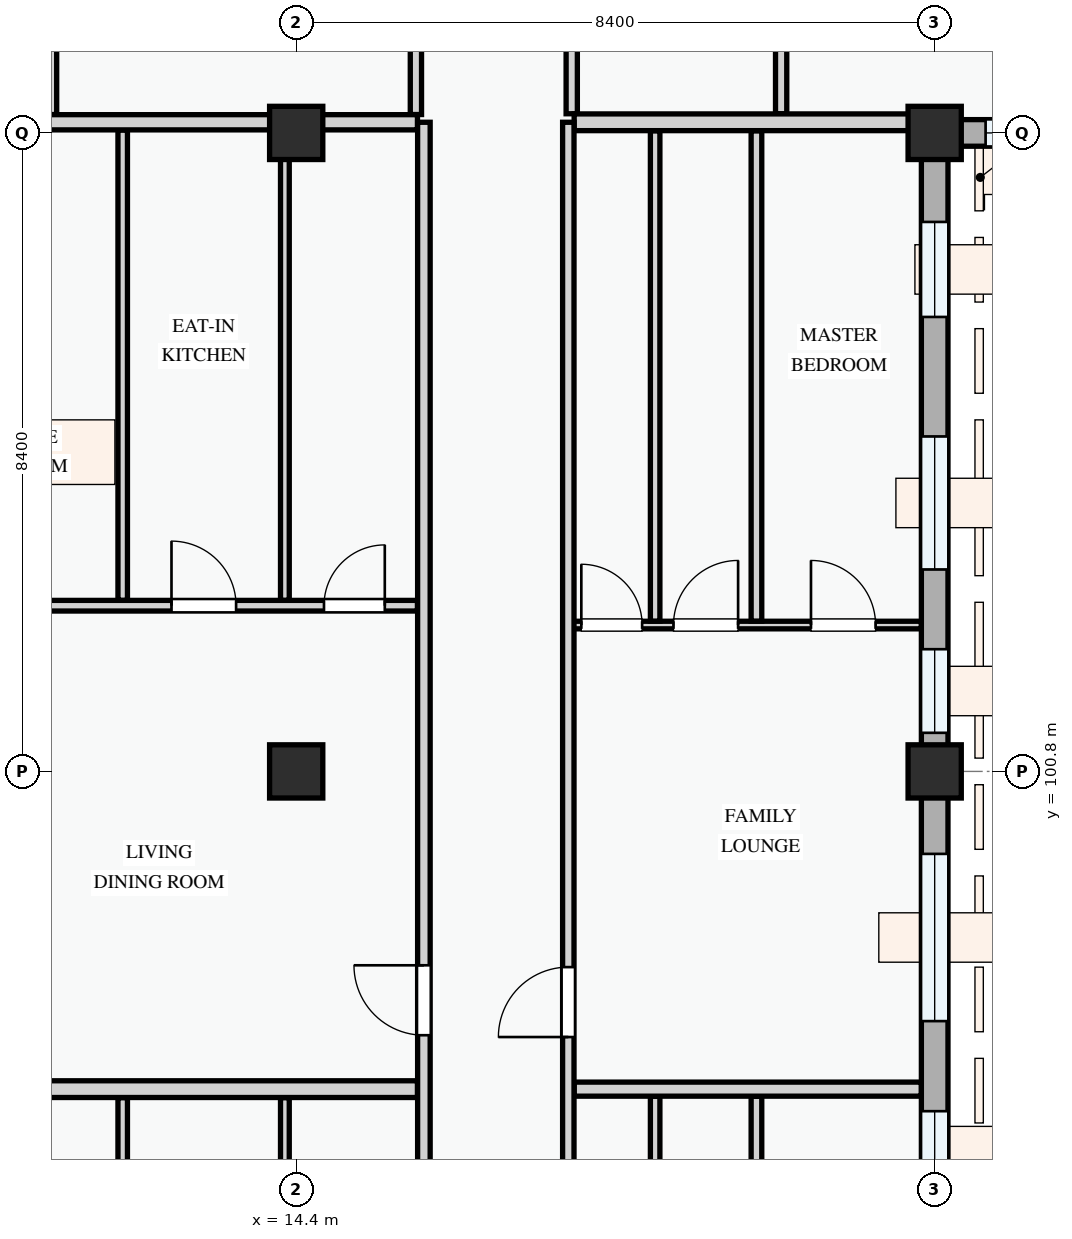
"""IFC4 building model, lengths in metres.
Left out: names, types, materials, properties, quantities, classifications, styles, units other than length and angle.
Written with IfcOpenShell. Run it as: python <this file> out.ifc"""

import sys

from ifc_helpers import new_model, si_unit, direction, frame, frame_2d, origin, origin_2d, place, context, subcontext, project, spatial, rectangle, extrude, element, fill, save


model = new_model("IFC4")
c1 = context("Model", 3, precision=1e-05, world=origin(), true_north=direction((0.0, 1.0)))
c2 = subcontext(c1, "Body", "Model", "MODEL_VIEW")
j1 = project(units=[si_unit("LENGTHUNIT", "METRE"), si_unit("PLANEANGLEUNIT", "RADIAN")], contexts=[c1])
p1 = place(None, origin())
s1 = spatial("IfcSite", under=j1, at=p1, CompositionType="ELEMENT")
p2 = place(p1, origin())
s2 = spatial("IfcBuilding", under=s1, at=p2, CompositionType="ELEMENT")
p3 = place(p2, frame((0.0, 0.0, 14.7)))
s3 = spatial("IfcBuildingStorey", under=s2, at=p3, CompositionType="ELEMENT", Elevation=14.7)
for number, where, z_axis, x_axis in (
    (1, (14.4, 100.8, 0.0), (0.0, 0.0, 1.0), (1.0, 0.0, 0.0)),
    (2, (14.4, 109.2, 0.0), (0.0, 0.0, 1.0), (1.0, 0.0, 0.0)),
    (3, (22.8, 100.8, 0.0), (0.0, 0.0, 1.0), (1.0, 0.0, 0.0)),
    (4, (22.8, 109.2, 0.0), (0.0, 0.0, 1.0), (1.0, 0.0, 0.0)),
):
    element("IfcColumn", number, at=place(p3, frame(where, z_axis=z_axis, x_axis=x_axis)), inside=s3, PredefinedType="COLUMN", context=c2, shape_type="SweptSolid", body=[
        extrude(rectangle(XDim=0.7, YDim=0.7, at=origin_2d()), origin(), (0.0, 0.0, 1.0), 3.3),
    ])
p4 = place(p3, frame((22.8, 109.2, 0.0), z_axis=(0.0, 0.0, 1.0), x_axis=(1.0, 0.0, 0.0)))
e5 = element("IfcWall", 5, at=p4, inside=s3, PredefinedType="STANDARD", context=c2, shape_type="SweptSolid", body=[
    extrude(rectangle(XDim=6.0, YDim=0.35, at=frame_2d((3.0, 0.0))), origin(), (0.0, 0.0, 1.0), 2.475),
])
p5 = place(p4, frame((0.67, 0.0, 0.78)))
e6 = element("IfcOpeningElement", 6, at=p5, cuts=e5, PredefinedType="OPENING", context=c2, shape_type="SweptSolid", body=[
    extrude(rectangle(XDim=1.2, YDim=1.35, at=frame_2d((0.6, 0.675))), frame((0.0, 0.185, 0.0), z_axis=(0.0, -1.0, 0.0), x_axis=(1.0, 0.0, 0.0)), (0.0, 0.0, 1.0), 0.37),
])
p6 = place(p4, frame((2.905, 0.0, 0.78)))
e7 = element("IfcOpeningElement", 7, at=p6, cuts=e5, PredefinedType="OPENING", context=c2, shape_type="SweptSolid", body=[
    extrude(rectangle(XDim=2.35, YDim=1.55, at=frame_2d((1.175, 0.775))), frame((0.0, 0.185, 0.0), z_axis=(0.0, -1.0, 0.0), x_axis=(1.0, 0.0, 0.0)), (0.0, 0.0, 1.0), 0.37),
])
p7 = place(p3, frame((22.8, 94.8, 0.0), z_axis=(0.0, 0.0, 1.0), x_axis=(0.0, 1.0, 0.0)))
e8 = element("IfcWall", 8, at=p7, inside=s3, PredefinedType="STANDARD", context=c2, shape_type="SweptSolid", body=[
    extrude(rectangle(XDim=6.0, YDim=0.35, at=frame_2d((3.0, 0.0))), origin(), (0.0, 0.0, 1.0), 2.575),
])
p8 = place(p7, frame((0.48, 0.0, 0.78)))
e9 = element("IfcOpeningElement", 9, at=p8, cuts=e8, PredefinedType="OPENING", context=c2, shape_type="SweptSolid", body=[
    extrude(rectangle(XDim=1.05, YDim=1.2, at=frame_2d((0.525, 0.6))), frame((0.0, 0.185, 0.0), z_axis=(0.0, -1.0, 0.0), x_axis=(1.0, 0.0, 0.0)), (0.0, 0.0, 1.0), 0.37),
])
p9 = place(p7, frame((2.715, 0.0, 0.78)))
e10 = element("IfcOpeningElement", 10, at=p9, cuts=e8, PredefinedType="OPENING", context=c2, shape_type="SweptSolid", body=[
    extrude(rectangle(XDim=2.2, YDim=1.5, at=frame_2d((1.1, 0.75))), frame((0.0, 0.185, 0.0), z_axis=(0.0, -1.0, 0.0), x_axis=(1.0, 0.0, 0.0)), (0.0, 0.0, 1.0), 0.37),
])
p10 = place(p3, frame((22.8, 100.8, 0.0), z_axis=(0.0, 0.0, 1.0), x_axis=(0.0, 1.0, 0.0)))
e11 = element("IfcWall", 11, at=p10, inside=s3, PredefinedType="STANDARD", context=c2, shape_type="SweptSolid", body=[
    extrude(rectangle(XDim=8.4, YDim=0.35, at=frame_2d((4.2, 0.0))), origin(), (0.0, 0.0, 1.0), 2.425),
])
p11 = place(p10, frame((0.508, 0.0, 0.78)))
e12 = element("IfcOpeningElement", 12, at=p11, cuts=e11, PredefinedType="OPENING", context=c2, shape_type="SweptSolid", body=[
    extrude(rectangle(XDim=1.1, YDim=1.3, at=frame_2d((0.55, 0.65))), frame((0.0, 0.185, 0.0), z_axis=(0.0, -1.0, 0.0), x_axis=(1.0, 0.0, 0.0)), (0.0, 0.0, 1.0), 0.37),
])
p12 = place(p10, frame((2.657, 0.0, 0.78)))
e13 = element("IfcOpeningElement", 13, at=p12, cuts=e11, PredefinedType="OPENING", context=c2, shape_type="SweptSolid", body=[
    extrude(rectangle(XDim=1.75, YDim=1.45, at=frame_2d((0.875, 0.725))), frame((0.0, 0.185, 0.0), z_axis=(0.0, -1.0, 0.0), x_axis=(1.0, 0.0, 0.0)), (0.0, 0.0, 1.0), 0.37),
])
p13 = place(p10, frame((5.979, 0.0, 0.78)))
e14 = element("IfcOpeningElement", 14, at=p13, cuts=e11, PredefinedType="OPENING", context=c2, shape_type="SweptSolid", body=[
    extrude(rectangle(XDim=1.25, YDim=1.3, at=frame_2d((0.625, 0.65))), frame((0.0, 0.185, 0.0), z_axis=(0.0, -1.0, 0.0), x_axis=(1.0, 0.0, 0.0)), (0.0, 0.0, 1.0), 0.37),
])
for number, where, z_axis, x_axis in (
    (15, (11.175, 113.324, 0.0), (0.0, 0.0, 1.0), (0.0, -1.0, 0.0)),
    (16, (15.975, 113.324, 0.0), (0.0, 0.0, 1.0), (0.0, -1.0, 0.0)),
):
    element("IfcWall", number, at=place(p3, frame(where, z_axis=z_axis, x_axis=x_axis)), inside=s3, PredefinedType="PARTITIONING", context=c2, shape_type="SweptSolid", body=[
        extrude(rectangle(XDim=3.882, YDim=0.148, at=frame_2d((1.941, 0.0))), origin(), (0.0, 0.0, 1.0), 3.0),
    ])
for number, where, z_axis, x_axis in (
    (17, (18.025, 113.324, 0.0), (0.0, 0.0, 1.0), (0.0, -1.0, 0.0)),
    (18, (20.78, 113.324, 0.0), (0.0, 0.0, 1.0), (0.0, -1.0, 0.0)),
):
    element("IfcWall", number, at=place(p3, frame(where, z_axis=z_axis, x_axis=x_axis)), inside=s3, PredefinedType="PARTITIONING", context=c2, shape_type="SweptSolid", body=[
        extrude(rectangle(XDim=3.872, YDim=0.148, at=frame_2d((1.936, 0.0))), origin(), (0.0, 0.0, 1.0), 3.0),
    ])
p14 = place(p3, frame((12.118, 90.002, 0.0), z_axis=(0.0, 0.0, 1.0), x_axis=(0.0, 1.0, 0.0)))
e19 = element("IfcWall", 19, at=p14, inside=s3, PredefinedType="PARTITIONING", context=c2, shape_type="SweptSolid", body=[
    extrude(rectangle(XDim=6.506, YDim=0.125, at=frame_2d((3.253, 0.0))), origin(), (0.0, 0.0, 1.0), 3.0),
])
p15 = place(p3, frame((14.251, 90.002, 0.0), z_axis=(0.0, 0.0, 1.0), x_axis=(0.0, 1.0, 0.0)))
e20 = element("IfcWall", 20, at=p15, inside=s3, PredefinedType="PARTITIONING", context=c2, shape_type="SweptSolid", body=[
    extrude(rectangle(XDim=6.506, YDim=0.115, at=frame_2d((3.253, 0.0))), origin(), (0.0, 0.0, 1.0), 2.425),
])
p16 = place(p3, frame((20.455, 89.714, 0.0), z_axis=(0.0, 0.0, 1.0), x_axis=(0.0, 1.0, 0.0)))
e21 = element("IfcWall", 21, at=p16, inside=s3, PredefinedType="PARTITIONING", context=c2, shape_type="SweptSolid", body=[
    extrude(rectangle(XDim=6.811, YDim=0.14, at=frame_2d((3.406, 0.0))), origin(), (0.0, 0.0, 1.0), 3.0),
])
p17 = place(p3, frame((19.122, 89.714, 0.0), z_axis=(0.0, 0.0, 1.0), x_axis=(0.0, 1.0, 0.0)))
e22 = element("IfcWall", 22, at=p17, inside=s3, PredefinedType="PARTITIONING", context=c2, shape_type="SweptSolid", body=[
    extrude(rectangle(XDim=6.811, YDim=0.125, at=frame_2d((3.406, 0.0))), origin(), (0.0, 0.0, 1.0), 3.0),
])
p18 = place(p3, frame((8.577, 102.98, 0.0), z_axis=(0.0, 0.0, 1.0), x_axis=(1.0, 0.0, 0.0)))
e23 = element("IfcWall", 23, at=p18, inside=s3, PredefinedType="PARTITIONING", context=c2, shape_type="SweptSolid", body=[
    extrude(rectangle(XDim=7.419, YDim=0.14, at=frame_2d((3.709, 0.0))), origin(), (0.0, 0.0, 1.0), 3.0),
])
p19 = place(p18, frame((1.287, 0.0, 0.0)))
e24 = element("IfcOpeningElement", 24, at=p19, cuts=e23, PredefinedType="OPENING", context=c2, shape_type="SweptSolid", body=[
    extrude(rectangle(XDim=0.85, YDim=2.1, at=frame_2d((0.425, 1.05))), frame((0.0, 0.08, 0.0), z_axis=(0.0, -1.0, 0.0), x_axis=(1.0, 0.0, 0.0)), (0.0, 0.0, 1.0), 0.16),
])
p20 = place(p18, frame((4.182, 0.0, 0.0)))
e25 = element("IfcOpeningElement", 25, at=p20, cuts=e23, PredefinedType="OPENING", context=c2, shape_type="SweptSolid", body=[
    extrude(rectangle(XDim=0.85, YDim=2.1, at=frame_2d((0.425, 1.05))), frame((0.0, 0.08, 0.0), z_axis=(0.0, -1.0, 0.0), x_axis=(1.0, 0.0, 0.0)), (0.0, 0.0, 1.0), 0.16),
])
p21 = place(p18, frame((6.189, 0.0, 0.0)))
e26 = element("IfcOpeningElement", 26, at=p21, cuts=e23, PredefinedType="OPENING", context=c2, shape_type="SweptSolid", body=[
    extrude(rectangle(XDim=0.8, YDim=2.1, at=frame_2d((0.4, 1.05))), frame((0.0, 0.08, 0.0), z_axis=(0.0, -1.0, 0.0), x_axis=(1.0, 0.0, 0.0)), (0.0, 0.0, 1.0), 0.16),
])
p22 = place(p3, frame((12.118, 103.052, 0.0), z_axis=(0.0, 0.0, 1.0), x_axis=(0.0, 1.0, 0.0)))
e27 = element("IfcWall", 27, at=p22, inside=s3, PredefinedType="PARTITIONING", context=c2, shape_type="SweptSolid", body=[
    extrude(rectangle(XDim=6.186, YDim=0.125, at=frame_2d((3.093, 0.0))), origin(), (0.0, 0.0, 1.0), 3.0),
])
p23 = place(p3, frame((14.251, 103.052, 0.0), z_axis=(0.0, 0.0, 1.0), x_axis=(0.0, 1.0, 0.0)))
e28 = element("IfcWall", 28, at=p23, inside=s3, PredefinedType="PARTITIONING", context=c2, shape_type="SweptSolid", body=[
    extrude(rectangle(XDim=6.186, YDim=0.115, at=frame_2d((3.093, 0.0))), origin(), (0.0, 0.0, 1.0), 2.425),
])
p24 = place(p3, frame((17.98, 102.726, 0.0), z_axis=(0.0, 0.0, 1.0), x_axis=(1.0, 0.0, 0.0)))
e29 = element("IfcWall", 29, at=p24, inside=s3, PredefinedType="PARTITIONING", context=c2, shape_type="SweptSolid", body=[
    extrude(rectangle(XDim=4.643, YDim=0.1, at=frame_2d((2.322, 0.0))), origin(), (0.0, 0.0, 1.0), 3.0),
])
p25 = place(p24, frame((0.171, 0.0, 0.0)))
e30 = element("IfcOpeningElement", 30, at=p25, cuts=e29, PredefinedType="OPENING", context=c2, shape_type="SweptSolid", body=[
    extrude(rectangle(XDim=0.8, YDim=2.1, at=frame_2d((0.4, 1.05))), frame((0.0, 0.06, 0.0), z_axis=(0.0, -1.0, 0.0), x_axis=(1.0, 0.0, 0.0)), (0.0, 0.0, 1.0), 0.12),
])
p26 = place(p24, frame((1.384, 0.0, 0.0)))
e31 = element("IfcOpeningElement", 31, at=p26, cuts=e29, PredefinedType="OPENING", context=c2, shape_type="SweptSolid", body=[
    extrude(rectangle(XDim=0.85, YDim=2.1, at=frame_2d((0.425, 1.05))), frame((0.0, 0.06, 0.0), z_axis=(0.0, -1.0, 0.0), x_axis=(1.0, 0.0, 0.0)), (0.0, 0.0, 1.0), 0.12),
])
p27 = place(p24, frame((3.193, 0.0, 0.0)))
e32 = element("IfcOpeningElement", 32, at=p27, cuts=e29, PredefinedType="OPENING", context=c2, shape_type="SweptSolid", body=[
    extrude(rectangle(XDim=0.85, YDim=2.1, at=frame_2d((0.425, 1.05))), frame((0.0, 0.06, 0.0), z_axis=(0.0, -1.0, 0.0), x_axis=(1.0, 0.0, 0.0)), (0.0, 0.0, 1.0), 0.12),
])
p28 = place(p3, frame((20.455, 102.778, 0.0), z_axis=(0.0, 0.0, 1.0), x_axis=(0.0, 1.0, 0.0)))
e33 = element("IfcWall", 33, at=p28, inside=s3, PredefinedType="PARTITIONING", context=c2, shape_type="SweptSolid", body=[
    extrude(rectangle(XDim=6.45, YDim=0.14, at=frame_2d((3.225, 0.0))), origin(), (0.0, 0.0, 1.0), 3.0),
])
p29 = place(p3, frame((19.122, 102.778, 0.0), z_axis=(0.0, 0.0, 1.0), x_axis=(0.0, 1.0, 0.0)))
e34 = element("IfcWall", 34, at=p29, inside=s3, PredefinedType="PARTITIONING", context=c2, shape_type="SweptSolid", body=[
    extrude(rectangle(XDim=6.45, YDim=0.125, at=frame_2d((3.225, 0.0))), origin(), (0.0, 0.0, 1.0), 3.0),
])
p30 = place(p3, frame((8.577, 96.62, 0.0), z_axis=(0.0, 0.0, 1.0), x_axis=(1.0, 0.0, 0.0)))
e35 = element("IfcWall", 35, at=p30, inside=s3, PredefinedType="PARTITIONING", context=c2, shape_type="SweptSolid", body=[
    extrude(rectangle(XDim=7.419, YDim=0.22, at=frame_2d((3.709, 0.0))), origin(), (0.0, 0.0, 1.0), 3.0),
])
p31 = place(p3, frame((18.057, 96.62, 0.0), z_axis=(0.0, 0.0, 1.0), x_axis=(1.0, 0.0, 0.0)))
e36 = element("IfcWall", 36, at=p31, inside=s3, PredefinedType="PARTITIONING", context=c2, shape_type="SweptSolid", body=[
    extrude(rectangle(XDim=4.566, YDim=0.185, at=frame_2d((2.283, 0.0))), origin(), (0.0, 0.0, 1.0), 3.0),
])
p32 = place(p3, frame((8.577, 109.34, 0.0), z_axis=(0.0, 0.0, 1.0), x_axis=(1.0, 0.0, 0.0)))
e37 = element("IfcWall", 37, at=p32, inside=s3, PredefinedType="PARTITIONING", context=c2, shape_type="SweptSolid", body=[
    extrude(rectangle(XDim=7.419, YDim=0.2, at=frame_2d((3.709, 0.0))), origin(), (0.0, 0.0, 1.0), 2.375),
])
p33 = place(p3, frame((18.057, 109.34, 0.0), z_axis=(0.0, 0.0, 1.0), x_axis=(1.0, 0.0, 0.0)))
e38 = element("IfcWall", 38, at=p33, inside=s3, PredefinedType="PARTITIONING", context=c2, shape_type="SweptSolid", body=[
    extrude(rectangle(XDim=4.683, YDim=0.22, at=frame_2d((2.342, 0.0))), origin(), (0.0, 0.0, 1.0), 2.375),
])
p34 = place(p3, frame((16.08, 72.177, 0.0), z_axis=(0.0, 0.0, 1.0), x_axis=(0.0, 1.0, 0.0)))
e39 = element("IfcWall", 39, at=p34, inside=s3, PredefinedType="PARTITIONING", context=c2, shape_type="SweptSolid", body=[
    extrude(rectangle(XDim=37.163, YDim=0.165, at=frame_2d((18.582, 0.0))), origin(), (0.0, 0.0, 1.0), 3.0),
])
p35 = place(p34, frame((3.489, 0.0, 0.0)))
e40 = element("IfcOpeningElement", 40, at=p35, cuts=e39, PredefinedType="OPENING", context=c2, shape_type="SweptSolid", body=[
    extrude(rectangle(XDim=0.92, YDim=2.1, at=frame_2d((0.46, 1.05))), frame((0.0, 0.093, 0.0), z_axis=(0.0, -1.0, 0.0), x_axis=(1.0, 0.0, 0.0)), (0.0, 0.0, 1.0), 0.185),
])
p36 = place(p34, frame((16.543, 0.0, 0.0)))
e41 = element("IfcOpeningElement", 41, at=p36, cuts=e39, PredefinedType="OPENING", context=c2, shape_type="SweptSolid", body=[
    extrude(rectangle(XDim=0.92, YDim=2.1, at=frame_2d((0.46, 1.05))), frame((0.0, 0.093, 0.0), z_axis=(0.0, -1.0, 0.0), x_axis=(1.0, 0.0, 0.0)), (0.0, 0.0, 1.0), 0.185),
])
p37 = place(p34, frame((25.152, 0.0, 0.0)))
e42 = element("IfcOpeningElement", 42, at=p37, cuts=e39, PredefinedType="OPENING", context=c2, shape_type="SweptSolid", body=[
    extrude(rectangle(XDim=0.92, YDim=2.1, at=frame_2d((0.46, 1.05))), frame((0.0, 0.093, 0.0), z_axis=(0.0, -1.0, 0.0), x_axis=(1.0, 0.0, 0.0)), (0.0, 0.0, 1.0), 0.185),
])
p38 = place(p3, frame((17.98, 72.177, 0.0), z_axis=(0.0, 0.0, 1.0), x_axis=(0.0, 1.0, 0.0)))
e43 = element("IfcWall", 43, at=p38, inside=s3, PredefinedType="PARTITIONING", context=c2, shape_type="SweptSolid", body=[
    extrude(rectangle(XDim=37.163, YDim=0.15, at=frame_2d((18.582, 0.0))), origin(), (0.0, 0.0, 1.0), 3.0),
])
p39 = place(p38, frame((3.551, 0.0, 0.0)))
e44 = element("IfcOpeningElement", 44, at=p39, cuts=e43, PredefinedType="OPENING", context=c2, shape_type="SweptSolid", body=[
    extrude(rectangle(XDim=0.92, YDim=2.1, at=frame_2d((0.46, 1.05))), frame((0.0, 0.085, 0.0), z_axis=(0.0, -1.0, 0.0), x_axis=(1.0, 0.0, 0.0)), (0.0, 0.0, 1.0), 0.17),
])
p40 = place(p38, frame((16.275, 0.0, 0.0)))
e45 = element("IfcOpeningElement", 45, at=p40, cuts=e43, PredefinedType="OPENING", context=c2, shape_type="SweptSolid", body=[
    extrude(rectangle(XDim=0.96, YDim=2.12, at=frame_2d((0.48, 1.06))), frame((0.0, 0.085, 0.0), z_axis=(0.0, -1.0, 0.0), x_axis=(1.0, 0.0, 0.0)), (0.0, 0.0, 1.0), 0.17),
])
p41 = place(p38, frame((25.128, 0.0, 0.0)))
e46 = element("IfcOpeningElement", 46, at=p41, cuts=e43, PredefinedType="OPENING", context=c2, shape_type="SweptSolid", body=[
    extrude(rectangle(XDim=0.92, YDim=2.1, at=frame_2d((0.46, 1.05))), frame((0.0, 0.085, 0.0), z_axis=(0.0, -1.0, 0.0), x_axis=(1.0, 0.0, 0.0)), (0.0, 0.0, 1.0), 0.17),
])
p42 = place(p5, origin())
e47 = element("IfcWindow", 47, at=p42, inside=s3, PartitioningType="SINGLE_PANEL", PredefinedType="WINDOW", context=c2, shape_type="SweptSolid", body=[
    extrude(rectangle(XDim=1.2, YDim=1.35, at=frame_2d((0.6, 0.675))), frame((0.0, 0.03, 0.0), z_axis=(0.0, -1.0, 0.0), x_axis=(1.0, 0.0, 0.0)), (0.0, 0.0, 1.0), 0.06),
])
fill(e6, e47)
p43 = place(p8, origin())
e48 = element("IfcWindow", 48, at=p43, inside=s3, PartitioningType="SINGLE_PANEL", PredefinedType="WINDOW", context=c2, shape_type="SweptSolid", body=[
    extrude(rectangle(XDim=1.05, YDim=1.2, at=frame_2d((0.525, 0.6))), frame((0.0, 0.03, 0.0), z_axis=(0.0, -1.0, 0.0), x_axis=(1.0, 0.0, 0.0)), (0.0, 0.0, 1.0), 0.06),
])
fill(e9, e48)
p44 = place(p9, origin())
e49 = element("IfcWindow", 49, at=p44, inside=s3, PartitioningType="DOUBLE_PANEL_VERTICAL", PredefinedType="WINDOW", context=c2, shape_type="SweptSolid", body=[
    extrude(rectangle(XDim=2.2, YDim=1.5, at=frame_2d((1.1, 0.75))), frame((0.0, 0.03, 0.0), z_axis=(0.0, -1.0, 0.0), x_axis=(1.0, 0.0, 0.0)), (0.0, 0.0, 1.0), 0.06),
])
fill(e10, e49)
p45 = place(p11, origin())
e50 = element("IfcWindow", 50, at=p45, inside=s3, PartitioningType="SINGLE_PANEL", PredefinedType="WINDOW", context=c2, shape_type="SweptSolid", body=[
    extrude(rectangle(XDim=1.1, YDim=1.3, at=frame_2d((0.55, 0.65))), frame((0.0, 0.03, 0.0), z_axis=(0.0, -1.0, 0.0), x_axis=(1.0, 0.0, 0.0)), (0.0, 0.0, 1.0), 0.06),
])
fill(e12, e50)
p46 = place(p12, origin())
e51 = element("IfcWindow", 51, at=p46, inside=s3, PartitioningType="DOUBLE_PANEL_VERTICAL", PredefinedType="WINDOW", context=c2, shape_type="SweptSolid", body=[
    extrude(rectangle(XDim=1.75, YDim=1.45, at=frame_2d((0.875, 0.725))), frame((0.0, 0.03, 0.0), z_axis=(0.0, -1.0, 0.0), x_axis=(1.0, 0.0, 0.0)), (0.0, 0.0, 1.0), 0.06),
])
fill(e13, e51)
p47 = place(p13, origin())
e52 = element("IfcWindow", 52, at=p47, inside=s3, PartitioningType="SINGLE_PANEL", PredefinedType="WINDOW", context=c2, shape_type="SweptSolid", body=[
    extrude(rectangle(XDim=1.25, YDim=1.3, at=frame_2d((0.625, 0.65))), frame((0.0, 0.03, 0.0), z_axis=(0.0, -1.0, 0.0), x_axis=(1.0, 0.0, 0.0)), (0.0, 0.0, 1.0), 0.06),
])
fill(e14, e52)
p48 = place(p20, origin())
e53 = element("IfcDoor", 53, at=p48, inside=s3, OperationType="SINGLE_SWING_LEFT", PredefinedType="DOOR", context=c2, shape_type="SweptSolid", body=[
    extrude(rectangle(XDim=0.85, YDim=2.1, at=frame_2d((0.425, 1.05))), frame((0.0, 0.025, 0.0), z_axis=(0.0, -1.0, 0.0), x_axis=(1.0, 0.0, 0.0)), (0.0, 0.0, 1.0), 0.05),
])
fill(e25, e53)
p49 = place(p21, origin())
e54 = element("IfcDoor", 54, at=p49, inside=s3, OperationType="SINGLE_SWING_RIGHT", PredefinedType="DOOR", context=c2, shape_type="SweptSolid", body=[
    extrude(rectangle(XDim=0.8, YDim=2.1, at=frame_2d((0.4, 1.05))), frame((0.0, 0.025, 0.0), z_axis=(0.0, -1.0, 0.0), x_axis=(1.0, 0.0, 0.0)), (0.0, 0.0, 1.0), 0.05),
])
fill(e26, e54)
p50 = place(p25, origin())
e55 = element("IfcDoor", 55, at=p50, inside=s3, OperationType="SINGLE_SWING_LEFT", PredefinedType="DOOR", context=c2, shape_type="SweptSolid", body=[
    extrude(rectangle(XDim=0.8, YDim=2.1, at=frame_2d((0.4, 1.05))), frame((0.0, 0.025, 0.0), z_axis=(0.0, -1.0, 0.0), x_axis=(1.0, 0.0, 0.0)), (0.0, 0.0, 1.0), 0.05),
])
fill(e30, e55)
p51 = place(p26, origin())
e56 = element("IfcDoor", 56, at=p51, inside=s3, OperationType="SINGLE_SWING_RIGHT", PredefinedType="DOOR", context=c2, shape_type="SweptSolid", body=[
    extrude(rectangle(XDim=0.85, YDim=2.1, at=frame_2d((0.425, 1.05))), frame((0.0, 0.025, 0.0), z_axis=(0.0, -1.0, 0.0), x_axis=(1.0, 0.0, 0.0)), (0.0, 0.0, 1.0), 0.05),
])
fill(e31, e56)
p52 = place(p27, origin())
e57 = element("IfcDoor", 57, at=p52, inside=s3, OperationType="SINGLE_SWING_LEFT", PredefinedType="DOOR", context=c2, shape_type="SweptSolid", body=[
    extrude(rectangle(XDim=0.85, YDim=2.1, at=frame_2d((0.425, 1.05))), frame((0.0, 0.025, 0.0), z_axis=(0.0, -1.0, 0.0), x_axis=(1.0, 0.0, 0.0)), (0.0, 0.0, 1.0), 0.05),
])
fill(e32, e57)
p53 = place(p37, origin())
e58 = element("IfcDoor", 58, at=p53, inside=s3, OperationType="SINGLE_SWING_RIGHT", PredefinedType="DOOR", context=c2, shape_type="SweptSolid", body=[
    extrude(rectangle(XDim=0.92, YDim=2.1, at=frame_2d((0.46, 1.05))), frame((0.0, 0.025, 0.0), z_axis=(0.0, -1.0, 0.0), x_axis=(1.0, 0.0, 0.0)), (0.0, 0.0, 1.0), 0.05),
])
fill(e42, e58)
p54 = place(p41, origin())
e59 = element("IfcDoor", 59, at=p54, inside=s3, OperationType="SINGLE_SWING_LEFT", PredefinedType="DOOR", context=c2, shape_type="SweptSolid", body=[
    extrude(rectangle(XDim=0.92, YDim=2.1, at=frame_2d((0.46, 1.05))), frame((0.0, 0.025, 0.0), z_axis=(0.0, -1.0, 0.0), x_axis=(1.0, 0.0, 0.0)), (0.0, 0.0, 1.0), 0.05),
])
fill(e46, e59)
save(model, sys.argv[1])
